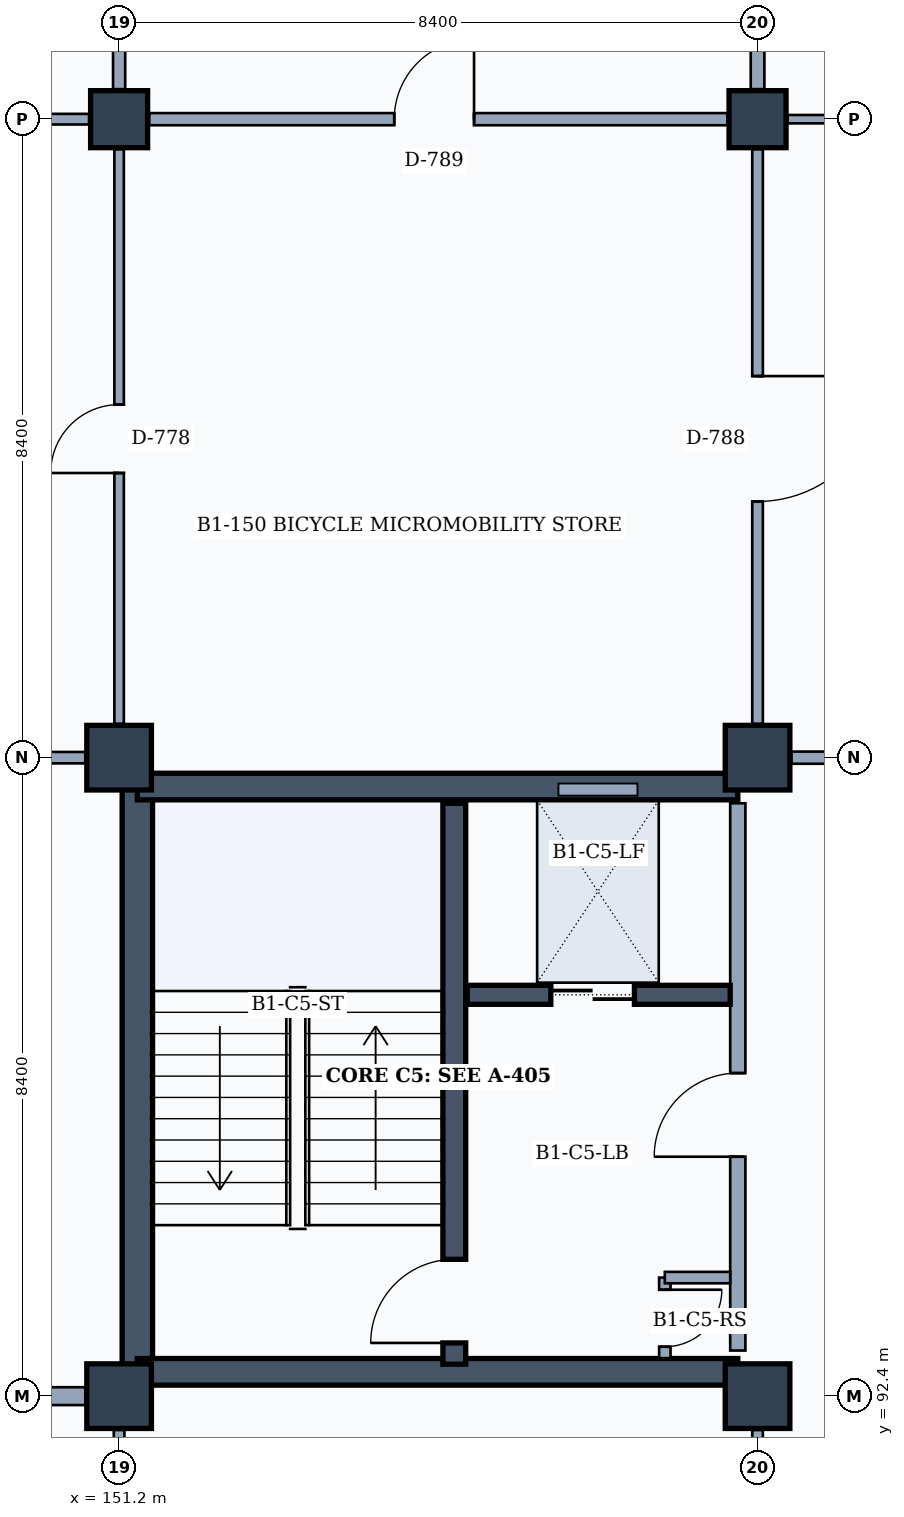
"""IFC4 building model, lengths in metres.
Left out: names, types, materials, properties, quantities, classifications, styles, units other than length and angle.
Written with IfcOpenShell. Run it as: python <this file> out.ifc"""

import sys

from ifc_helpers import new_model, si_unit, direction, frame, frame_2d, origin, origin_2d, place, context, subcontext, project, spatial, rectangle, extrude, element, fill, save


model = new_model("IFC4")
c1 = context("Model", 3, precision=1e-05, world=origin(), true_north=direction((0.0, 1.0)))
c2 = subcontext(c1, "Body", "Model", "MODEL_VIEW")
j1 = project(units=[si_unit("LENGTHUNIT", "METRE"), si_unit("PLANEANGLEUNIT", "RADIAN")], contexts=[c1])
p1 = place(None, origin())
s1 = spatial("IfcSite", under=j1, at=p1, CompositionType="ELEMENT")
p2 = place(p1, origin())
s2 = spatial("IfcBuilding", under=s1, at=p2, CompositionType="ELEMENT")
p3 = place(p2, frame((0.0, 0.0, -4.2)))
s3 = spatial("IfcBuildingStorey", under=s2, at=p3, CompositionType="ELEMENT", Elevation=-4.2)
for number, where, z_axis, x_axis in (
    (1, (151.2, 92.4, 0.0), (0.0, 0.0, 1.0), (1.0, 0.0, 0.0)),
    (2, (151.2, 100.8, 0.0), (0.0, 0.0, 1.0), (1.0, 0.0, 0.0)),
):
    element("IfcColumn", number, at=place(p3, frame(where, z_axis=z_axis, x_axis=x_axis)), inside=s3, PredefinedType="COLUMN", context=c2, shape_type="SweptSolid", body=[
        extrude(rectangle(XDim=0.85, YDim=0.85, at=origin_2d()), origin(), (0.0, 0.0, 1.0), 4.2),
    ])
p4 = place(p3, frame((151.2, 109.2, 0.0), z_axis=(0.0, 0.0, 1.0), x_axis=(1.0, 0.0, 0.0)))
e3 = element("IfcColumn", 3, at=p4, inside=s3, PredefinedType="COLUMN", context=c2, shape_type="SweptSolid", body=[
    extrude(rectangle(XDim=0.75, YDim=0.75, at=origin_2d()), origin(), (0.0, 0.0, 1.0), 4.2),
])
for number, where, z_axis, x_axis in (
    (4, (159.6, 92.4, 0.0), (0.0, 0.0, 1.0), (1.0, 0.0, 0.0)),
    (5, (159.6, 100.8, 0.0), (0.0, 0.0, 1.0), (1.0, 0.0, 0.0)),
):
    element("IfcColumn", number, at=place(p3, frame(where, z_axis=z_axis, x_axis=x_axis)), inside=s3, PredefinedType="COLUMN", context=c2, shape_type="SweptSolid", body=[
        extrude(rectangle(XDim=0.85, YDim=0.85, at=origin_2d()), origin(), (0.0, 0.0, 1.0), 4.2),
    ])
p5 = place(p3, frame((159.6, 109.2, 0.0), z_axis=(0.0, 0.0, 1.0), x_axis=(1.0, 0.0, 0.0)))
e6 = element("IfcColumn", 6, at=p5, inside=s3, PredefinedType="COLUMN", context=c2, shape_type="SweptSolid", body=[
    extrude(rectangle(XDim=0.75, YDim=0.75, at=origin_2d()), origin(), (0.0, 0.0, 1.0), 4.2),
])
p6 = place(p3, frame((151.44, 92.65, 0.0), z_axis=(0.0, 0.0, 1.0), x_axis=(0.0, 1.0, 0.0)))
e7 = element("IfcWall", 7, at=p6, inside=s3, PredefinedType="SHEAR", context=c2, shape_type="SweptSolid", body=[
    extrude(rectangle(XDim=7.94, YDim=0.4, at=frame_2d((3.97, 0.0))), origin(), (0.0, 0.0, 1.0), 3.9),
])
p7 = place(p3, frame((151.44, 100.42, 0.0), z_axis=(0.0, 0.0, 1.0), x_axis=(1.0, 0.0, 0.0)))
e8 = element("IfcWall", 8, at=p7, inside=s3, PredefinedType="SHEAR", context=c2, shape_type="SweptSolid", body=[
    extrude(rectangle(XDim=7.9, YDim=0.35, at=frame_2d((3.95, 0.0))), origin(), (0.0, 0.0, 1.0), 3.9),
])
p8 = place(p3, frame((159.34, 100.2, 0.0), z_axis=(0.0, 0.0, 1.0), x_axis=(0.0, -1.0, 0.0)))
e9 = element("IfcWall", 9, at=p8, inside=s3, PredefinedType="PARTITIONING", context=c2, shape_type="SweptSolid", body=[
    extrude(rectangle(XDim=7.2, YDim=0.2, at=frame_2d((3.6, 0.0))), origin(), (0.0, 0.0, 1.0), 3.1),
])
p9 = place(p8, frame((3.55, 0.0, 0.0)))
e10 = element("IfcOpeningElement", 10, at=p9, cuts=e9, PredefinedType="OPENING", context=c2, shape_type="SweptSolid", body=[
    extrude(rectangle(XDim=1.1, YDim=2.15, at=frame_2d((0.55, 1.075))), frame((0.0, 0.11, 0.0), z_axis=(0.0, -1.0, 0.0), x_axis=(1.0, 0.0, 0.0)), (0.0, 0.0, 1.0), 0.22),
])
p10 = place(p3, frame((159.34, 92.72, 0.0), z_axis=(0.0, 0.0, 1.0), x_axis=(-1.0, 0.0, 0.0)))
e11 = element("IfcWall", 11, at=p10, inside=s3, PredefinedType="SHEAR", context=c2, shape_type="SweptSolid", body=[
    extrude(rectangle(XDim=7.9, YDim=0.35, at=frame_2d((3.95, 0.0))), origin(), (0.0, 0.0, 1.0), 3.9),
])
p11 = place(p3, frame((155.61, 92.82, 0.0), z_axis=(0.0, 0.0, 1.0), x_axis=(0.0, 1.0, 0.0)))
e12 = element("IfcWall", 12, at=p11, inside=s3, PredefinedType="SHEAR", context=c2, shape_type="SweptSolid", body=[
    extrude(rectangle(XDim=7.38, YDim=0.3, at=frame_2d((3.69, 0.0))), origin(), (0.0, 0.0, 1.0), 3.9),
])
p12 = place(p11, frame((0.28, 0.0, 0.0)))
e13 = element("IfcOpeningElement", 13, at=p12, cuts=e12, PredefinedType="OPENING", context=c2, shape_type="SweptSolid", body=[
    extrude(rectangle(XDim=1.1, YDim=2.15, at=frame_2d((0.55, 1.075))), frame((0.0, 0.16, 0.0), z_axis=(0.0, -1.0, 0.0), x_axis=(1.0, 0.0, 0.0)), (0.0, 0.0, 1.0), 0.32),
])
p13 = place(p3, frame((158.38, 93.96, 0.0), z_axis=(0.0, 0.0, 1.0), x_axis=(0.0, -1.0, 0.0)))
e14 = element("IfcWall", 14, at=p13, inside=s3, PredefinedType="PARTITIONING", context=c2, shape_type="SweptSolid", body=[
    extrude(rectangle(XDim=1.06, YDim=0.15, at=frame_2d((0.53, 0.0))), origin(), (0.0, 0.0, 1.0), 3.32),
])
p14 = place(p13, frame((0.16, 0.0, 0.0)))
e15 = element("IfcOpeningElement", 15, at=p14, cuts=e14, PredefinedType="OPENING", context=c2, shape_type="SweptSolid", body=[
    extrude(rectangle(XDim=0.75, YDim=2.05, at=frame_2d((0.375, 1.025))), frame((0.0, 0.085, 0.0), z_axis=(0.0, -1.0, 0.0), x_axis=(1.0, 0.0, 0.0)), (0.0, 0.0, 1.0), 0.17),
])
p15 = place(p3, frame((158.38, 93.96, 0.0), z_axis=(0.0, 0.0, 1.0), x_axis=(1.0, 0.0, 0.0)))
e16 = element("IfcWall", 16, at=p15, inside=s3, PredefinedType="PARTITIONING", context=c2, shape_type="SweptSolid", body=[
    extrude(rectangle(XDim=0.86, YDim=0.15, at=frame_2d((0.43, 0.0))), origin(), (0.0, 0.0, 1.0), 3.32),
])
p16 = place(p3, frame((155.78, 97.68, 0.0), z_axis=(0.0, 0.0, 1.0), x_axis=(1.0, 0.0, 0.0)))
e17 = element("IfcWall", 17, at=p16, inside=s3, PredefinedType="SHEAR", context=c2, shape_type="SweptSolid", body=[
    extrude(rectangle(XDim=3.46, YDim=0.25, at=frame_2d((1.73, 0.0))), origin(), (0.0, 0.0, 1.0), 3.9),
])
p17 = place(p16, frame((1.1, 0.0, 0.0)))
e18 = element("IfcOpeningElement", 18, at=p17, cuts=e17, PredefinedType="OPENING", context=c2, shape_type="SweptSolid", body=[
    extrude(rectangle(XDim=1.1, YDim=2.15, at=frame_2d((0.55, 1.075))), frame((0.0, 0.135, 0.0), z_axis=(0.0, -1.0, 0.0), x_axis=(1.0, 0.0, 0.0)), (0.0, 0.0, 1.0), 0.27),
])
p18 = place(p3, frame((151.2, 84.395, 0.0), z_axis=(0.0, 0.0, 1.0), x_axis=(0.0, 1.0, 0.0)))
e19 = element("IfcWall", 19, at=p18, inside=s3, PredefinedType="PARTITIONING", context=c2, shape_type="SweptSolid", body=[
    extrude(rectangle(XDim=7.56, YDim=0.14, at=frame_2d((3.78, 0.0))), origin(), (0.0, 0.0, 1.0), 3.1),
])
p19 = place(p3, frame((143.195, 92.4, 0.0), z_axis=(0.0, 0.0, 1.0), x_axis=(1.0, 0.0, 0.0)))
e20 = element("IfcWall", 20, at=p19, inside=s3, PredefinedType="PARTITIONING", context=c2, shape_type="SweptSolid", body=[
    extrude(rectangle(XDim=7.56, YDim=0.235, at=frame_2d((3.78, 0.0))), origin(), (0.0, 0.0, 1.0), 3.05),
])
p20 = place(p19, frame((2.8, 0.0, 0.0)))
e21 = element("IfcOpeningElement", 21, at=p20, cuts=e20, PredefinedType="OPENING", context=c2, shape_type="SweptSolid", body=[
    extrude(rectangle(XDim=1.9, YDim=2.4, at=frame_2d((0.95, 1.2))), frame((0.0, 0.127, 0.0), z_axis=(0.0, -1.0, 0.0), x_axis=(1.0, 0.0, 0.0)), (0.0, 0.0, 1.0), 0.255),
])
p21 = place(p3, frame((143.195, 100.8, 0.0), z_axis=(0.0, 0.0, 1.0), x_axis=(1.0, 0.0, 0.0)))
e22 = element("IfcWall", 22, at=p21, inside=s3, PredefinedType="PARTITIONING", context=c2, shape_type="SweptSolid", body=[
    extrude(rectangle(XDim=7.56, YDim=0.15, at=frame_2d((3.78, 0.0))), origin(), (0.0, 0.0, 1.0), 3.05),
])
p22 = place(p3, frame((151.2, 101.245, 0.0), z_axis=(0.0, 0.0, 1.0), x_axis=(0.0, 1.0, 0.0)))
e23 = element("IfcWall", 23, at=p22, inside=s3, PredefinedType="PARTITIONING", context=c2, shape_type="SweptSolid", body=[
    extrude(rectangle(XDim=7.56, YDim=0.125, at=frame_2d((3.78, 0.0))), origin(), (0.0, 0.0, 1.0), 3.1),
])
p23 = place(p22, frame((3.3, 0.0, 0.0)))
e24 = element("IfcOpeningElement", 24, at=p23, cuts=e23, PredefinedType="OPENING", context=c2, shape_type="SweptSolid", body=[
    extrude(rectangle(XDim=0.9, YDim=2.1, at=frame_2d((0.45, 1.05))), frame((0.0, 0.073, 0.0), z_axis=(0.0, -1.0, 0.0), x_axis=(1.0, 0.0, 0.0)), (0.0, 0.0, 1.0), 0.145),
])
p24 = place(p3, frame((143.195, 109.2, 0.0), z_axis=(0.0, 0.0, 1.0), x_axis=(1.0, 0.0, 0.0)))
e25 = element("IfcWall", 25, at=p24, inside=s3, PredefinedType="PARTITIONING", context=c2, shape_type="SweptSolid", body=[
    extrude(rectangle(XDim=7.61, YDim=0.14, at=frame_2d((3.805, 0.0))), origin(), (0.0, 0.0, 1.0), 3.05),
])
p25 = place(p24, frame((3.125, 0.0, 0.0)))
e26 = element("IfcOpeningElement", 26, at=p25, cuts=e25, PredefinedType="OPENING", context=c2, shape_type="SweptSolid", body=[
    extrude(rectangle(XDim=1.25, YDim=2.3, at=frame_2d((0.625, 1.15))), frame((0.0, 0.08, 0.0), z_axis=(0.0, -1.0, 0.0), x_axis=(1.0, 0.0, 0.0)), (0.0, 0.0, 1.0), 0.16),
])
p26 = place(p3, frame((151.2, 109.595, 0.0), z_axis=(0.0, 0.0, 1.0), x_axis=(0.0, 1.0, 0.0)))
e27 = element("IfcWall", 27, at=p26, inside=s3, PredefinedType="PARTITIONING", context=c2, shape_type="SweptSolid", body=[
    extrude(rectangle(XDim=7.61, YDim=0.16, at=frame_2d((3.805, 0.0))), origin(), (0.0, 0.0, 1.0), 3.1),
])
p27 = place(p3, frame((159.6, 84.395, 0.0), z_axis=(0.0, 0.0, 1.0), x_axis=(0.0, 1.0, 0.0)))
e28 = element("IfcWall", 28, at=p27, inside=s3, PredefinedType="PARTITIONING", context=c2, shape_type="SweptSolid", body=[
    extrude(rectangle(XDim=7.56, YDim=0.14, at=frame_2d((3.78, 0.0))), origin(), (0.0, 0.0, 1.0), 3.1),
])
p28 = place(p27, frame((3.275, 0.0, 0.0)))
e29 = element("IfcOpeningElement", 29, at=p28, cuts=e28, PredefinedType="OPENING", context=c2, shape_type="SweptSolid", body=[
    extrude(rectangle(XDim=0.95, YDim=2.15, at=frame_2d((0.475, 1.075))), frame((0.0, 0.08, 0.0), z_axis=(0.0, -1.0, 0.0), x_axis=(1.0, 0.0, 0.0)), (0.0, 0.0, 1.0), 0.16),
])
p29 = place(p3, frame((159.6, 101.245, 0.0), z_axis=(0.0, 0.0, 1.0), x_axis=(0.0, 1.0, 0.0)))
e30 = element("IfcWall", 30, at=p29, inside=s3, PredefinedType="PARTITIONING", context=c2, shape_type="SweptSolid", body=[
    extrude(rectangle(XDim=7.56, YDim=0.14, at=frame_2d((3.78, 0.0))), origin(), (0.0, 0.0, 1.0), 3.1),
])
p30 = place(p29, frame((2.925, 0.0, 0.0)))
e31 = element("IfcOpeningElement", 31, at=p30, cuts=e30, PredefinedType="OPENING", context=c2, shape_type="SweptSolid", body=[
    extrude(rectangle(XDim=1.65, YDim=2.25, at=frame_2d((0.825, 1.125))), frame((0.0, 0.08, 0.0), z_axis=(0.0, -1.0, 0.0), x_axis=(1.0, 0.0, 0.0)), (0.0, 0.0, 1.0), 0.16),
])
p31 = place(p3, frame((151.595, 109.2, 0.0), z_axis=(0.0, 0.0, 1.0), x_axis=(1.0, 0.0, 0.0)))
e32 = element("IfcWall", 32, at=p31, inside=s3, PredefinedType="PARTITIONING", context=c2, shape_type="SweptSolid", body=[
    extrude(rectangle(XDim=7.61, YDim=0.16, at=frame_2d((3.805, 0.0))), origin(), (0.0, 0.0, 1.0), 3.05),
])
p32 = place(p31, frame((3.225, 0.0, 0.0)))
e33 = element("IfcOpeningElement", 33, at=p32, cuts=e32, PredefinedType="OPENING", context=c2, shape_type="SweptSolid", body=[
    extrude(rectangle(XDim=1.05, YDim=2.2, at=frame_2d((0.525, 1.1))), frame((0.0, 0.09, 0.0), z_axis=(0.0, -1.0, 0.0), x_axis=(1.0, 0.0, 0.0)), (0.0, 0.0, 1.0), 0.18),
])
p33 = place(p3, frame((159.6, 109.595, 0.0), z_axis=(0.0, 0.0, 1.0), x_axis=(0.0, 1.0, 0.0)))
e34 = element("IfcWall", 34, at=p33, inside=s3, PredefinedType="PARTITIONING", context=c2, shape_type="SweptSolid", body=[
    extrude(rectangle(XDim=7.61, YDim=0.18, at=frame_2d((3.805, 0.0))), origin(), (0.0, 0.0, 1.0), 3.1),
])
p34 = place(p3, frame((160.045, 100.8, 0.0), z_axis=(0.0, 0.0, 1.0), x_axis=(1.0, 0.0, 0.0)))
e35 = element("IfcWall", 35, at=p34, inside=s3, PredefinedType="PARTITIONING", context=c2, shape_type="SweptSolid", body=[
    extrude(rectangle(XDim=7.56, YDim=0.16, at=frame_2d((3.78, 0.0))), origin(), (0.0, 0.0, 1.0), 3.05),
])
p35 = place(p34, frame((2.85, 0.0, 0.0)))
e36 = element("IfcOpeningElement", 36, at=p35, cuts=e35, PredefinedType="OPENING", context=c2, shape_type="SweptSolid", body=[
    extrude(rectangle(XDim=1.8, YDim=2.3, at=frame_2d((0.9, 1.15))), frame((0.0, 0.09, 0.0), z_axis=(0.0, -1.0, 0.0), x_axis=(1.0, 0.0, 0.0)), (0.0, 0.0, 1.0), 0.18),
])
p36 = place(p3, frame((159.995, 109.2, 0.0), z_axis=(0.0, 0.0, 1.0), x_axis=(1.0, 0.0, 0.0)))
e37 = element("IfcWall", 37, at=p36, inside=s3, PredefinedType="PARTITIONING", context=c2, shape_type="SweptSolid", body=[
    extrude(rectangle(XDim=7.61, YDim=0.11, at=frame_2d((3.805, 0.0))), origin(), (0.0, 0.0, 1.0), 3.05),
])
p37 = place(p36, frame((3.15, 0.0, 0.0)))
e38 = element("IfcOpeningElement", 38, at=p37, cuts=e37, PredefinedType="OPENING", context=c2, shape_type="SweptSolid", body=[
    extrude(rectangle(XDim=1.2, YDim=2.2, at=frame_2d((0.6, 1.1))), frame((0.0, 0.065, 0.0), z_axis=(0.0, -1.0, 0.0), x_axis=(1.0, 0.0, 0.0)), (0.0, 0.0, 1.0), 0.13),
])
p38 = place(p9, frame((1.1, 0.0, 0.0), z_axis=(0.0, 0.0, 1.0), x_axis=(-1.0, 0.0, 0.0)))
e39 = element("IfcDoor", 39, at=p38, inside=s3, OperationType="SINGLE_SWING_LEFT", PredefinedType="DOOR", context=c2, shape_type="SweptSolid", body=[
    extrude(rectangle(XDim=1.1, YDim=2.15, at=frame_2d((0.55, 1.075))), frame((0.0, 0.025, 0.0), z_axis=(0.0, -1.0, 0.0), x_axis=(1.0, 0.0, 0.0)), (0.0, 0.0, 1.0), 0.05),
])
fill(e10, e39)
p39 = place(p12, origin())
e40 = element("IfcDoor", 40, at=p39, inside=s3, OperationType="SINGLE_SWING_LEFT", PredefinedType="DOOR", context=c2, shape_type="SweptSolid", body=[
    extrude(rectangle(XDim=1.1, YDim=2.15, at=frame_2d((0.55, 1.075))), frame((0.0, 0.025, 0.0), z_axis=(0.0, -1.0, 0.0), x_axis=(1.0, 0.0, 0.0)), (0.0, 0.0, 1.0), 0.05),
])
fill(e13, e40)
p40 = place(p14, origin())
e41 = element("IfcDoor", 41, at=p40, inside=s3, OperationType="SINGLE_SWING_LEFT", PredefinedType="TRAPDOOR", context=c2, shape_type="SweptSolid", body=[
    extrude(rectangle(XDim=0.75, YDim=2.05, at=frame_2d((0.375, 1.025))), frame((0.0, 0.025, 0.0), z_axis=(0.0, -1.0, 0.0), x_axis=(1.0, 0.0, 0.0)), (0.0, 0.0, 1.0), 0.05),
])
fill(e15, e41)
p41 = place(p17, origin())
e42 = element("IfcDoor", 42, at=p41, inside=s3, OperationType="DOUBLE_DOOR_SLIDING", PredefinedType="DOOR", context=c2, shape_type="SweptSolid", body=[
    extrude(rectangle(XDim=1.1, YDim=2.15, at=frame_2d((0.55, 1.075))), frame((0.0, 0.025, 0.0), z_axis=(0.0, -1.0, 0.0), x_axis=(1.0, 0.0, 0.0)), (0.0, 0.0, 1.0), 0.05),
])
fill(e18, e42)
p42 = place(p23, origin())
e43 = element("IfcDoor", 43, at=p42, inside=s3, OperationType="SINGLE_SWING_LEFT", PredefinedType="DOOR", context=c2, shape_type="SweptSolid", body=[
    extrude(rectangle(XDim=0.9, YDim=2.1, at=frame_2d((0.45, 1.05))), frame((0.0, 0.025, 0.0), z_axis=(0.0, -1.0, 0.0), x_axis=(1.0, 0.0, 0.0)), (0.0, 0.0, 1.0), 0.05),
])
fill(e24, e43)
p43 = place(p30, frame((1.65, 0.0, 0.0), z_axis=(0.0, 0.0, 1.0), x_axis=(-1.0, 0.0, 0.0)))
e44 = element("IfcDoor", 44, at=p43, inside=s3, OperationType="SINGLE_SWING_LEFT", PredefinedType="DOOR", context=c2, shape_type="SweptSolid", body=[
    extrude(rectangle(XDim=1.65, YDim=2.25, at=frame_2d((0.825, 1.125))), frame((0.0, 0.025, 0.0), z_axis=(0.0, -1.0, 0.0), x_axis=(1.0, 0.0, 0.0)), (0.0, 0.0, 1.0), 0.05),
])
fill(e31, e44)
p44 = place(p32, origin())
e45 = element("IfcDoor", 45, at=p44, inside=s3, OperationType="SINGLE_SWING_RIGHT", PredefinedType="DOOR", context=c2, shape_type="SweptSolid", body=[
    extrude(rectangle(XDim=1.05, YDim=2.2, at=frame_2d((0.525, 1.1))), frame((0.0, 0.025, 0.0), z_axis=(0.0, -1.0, 0.0), x_axis=(1.0, 0.0, 0.0)), (0.0, 0.0, 1.0), 0.05),
])
fill(e33, e45)
save(model, sys.argv[1])
